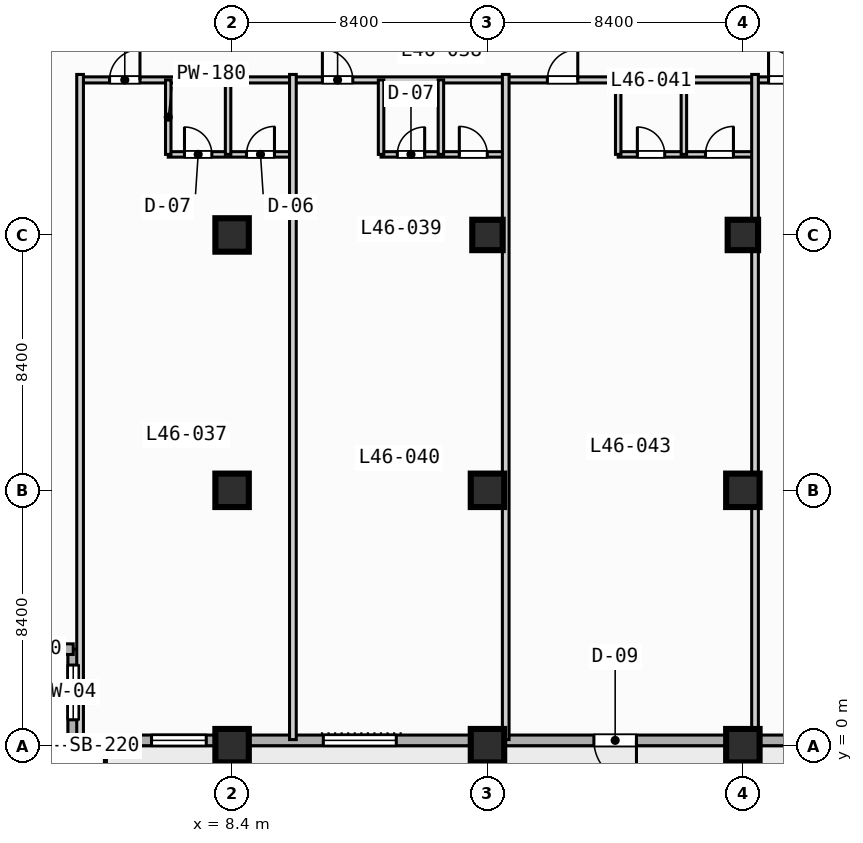
"""IFC4 building model, lengths in metres.
Left out: names, types, materials, properties, quantities, classifications, styles, units other than length and angle.
Written with IfcOpenShell. Run it as: python <this file> out.ifc"""

import sys

from ifc_helpers import new_model, si_unit, direction, frame, frame_2d, origin, origin_2d, place, context, subcontext, project, spatial, rectangle, extrude, element, fill, save


model = new_model("IFC4")
c1 = context("Model", 3, precision=1e-05, world=origin(), true_north=direction((0.0, 1.0)))
c2 = subcontext(c1, "Body", "Model", "MODEL_VIEW")
j1 = project(units=[si_unit("LENGTHUNIT", "METRE"), si_unit("PLANEANGLEUNIT", "RADIAN")], contexts=[c1])
p1 = place(None, origin())
s1 = spatial("IfcSite", under=j1, at=p1, CompositionType="ELEMENT")
p2 = place(p1, origin())
s2 = spatial("IfcBuilding", under=s1, at=p2, CompositionType="ELEMENT")
p3 = place(p2, frame((0.0, 0.0, 190.2)))
s3 = spatial("IfcBuildingStorey", under=s2, at=p3, CompositionType="ELEMENT", Elevation=190.2)
for number, where, z_axis, x_axis in (
    (1, (8.4, 0.0, 0.0), (0.0, 0.0, 1.0), (1.0, 0.0, 0.0)),
    (2, (8.4, 8.4, 0.0), (0.0, 0.0, 1.0), (1.0, 0.0, 0.0)),
    (3, (8.4, 16.8, 0.0), (0.0, 0.0, 1.0), (1.0, 0.0, 0.0)),
    (4, (16.8, 0.0, 0.0), (0.0, 0.0, 1.0), (1.0, 0.0, 0.0)),
    (5, (16.8, 8.4, 0.0), (0.0, 0.0, 1.0), (1.0, 0.0, 0.0)),
):
    element("IfcColumn", number, at=place(p3, frame(where, z_axis=z_axis, x_axis=x_axis)), inside=s3, PredefinedType="COLUMN", context=c2, shape_type="SweptSolid", body=[
        extrude(rectangle(XDim=1.1, YDim=1.1, at=origin_2d()), origin(), (0.0, 0.0, 1.0), 3.7),
    ])
p4 = place(p3, frame((16.8, 16.8, 0.0), z_axis=(0.0, 0.0, 1.0), x_axis=(1.0, 0.0, 0.0)))
e6 = element("IfcColumn", 6, at=p4, inside=s3, PredefinedType="COLUMN", context=c2, shape_type="SweptSolid", body=[
    extrude(rectangle(XDim=1.0, YDim=1.0, at=origin_2d()), origin(), (0.0, 0.0, 1.0), 3.7),
])
for number, where, z_axis, x_axis in (
    (7, (25.2, 0.0, 0.0), (0.0, 0.0, 1.0), (1.0, 0.0, 0.0)),
    (8, (25.2, 8.4, 0.0), (0.0, 0.0, 1.0), (1.0, 0.0, 0.0)),
):
    element("IfcColumn", number, at=place(p3, frame(where, z_axis=z_axis, x_axis=x_axis)), inside=s3, PredefinedType="COLUMN", context=c2, shape_type="SweptSolid", body=[
        extrude(rectangle(XDim=1.1, YDim=1.1, at=origin_2d()), origin(), (0.0, 0.0, 1.0), 3.7),
    ])
p5 = place(p3, frame((25.2, 16.8, 0.0), z_axis=(0.0, 0.0, 1.0), x_axis=(1.0, 0.0, 0.0)))
e9 = element("IfcColumn", 9, at=p5, inside=s3, PredefinedType="COLUMN", context=c2, shape_type="SweptSolid", body=[
    extrude(rectangle(XDim=1.0, YDim=1.0, at=origin_2d()), origin(), (0.0, 0.0, 1.0), 3.7),
])
p6 = place(p3, frame((3.175, 0.175, 0.0), z_axis=(0.0, 0.0, 1.0), x_axis=(0.0, 1.0, 0.0)))
e10 = element("IfcWall", 10, at=p6, inside=s3, PredefinedType="STANDARD", context=c2, shape_type="SweptSolid", body=[
    extrude(rectangle(XDim=3.0, YDim=0.35, at=frame_2d((1.5, 0.0))), origin(), (0.0, 0.0, 1.0), 3.47),
])
p7 = place(p6, frame((0.677, 0.0, 0.85)))
e11 = element("IfcOpeningElement", 11, at=p7, cuts=e10, PredefinedType="OPENING", context=c2, shape_type="SweptSolid", body=[
    extrude(rectangle(XDim=1.8, YDim=1.8, at=frame_2d((0.9, 0.9))), frame((0.0, 0.185, 0.0), z_axis=(0.0, -1.0, 0.0), x_axis=(1.0, 0.0, 0.0)), (0.0, 0.0, 1.0), 0.37),
])
p8 = place(p3, frame((3.175, 3.175, 0.0), z_axis=(0.0, 0.0, 1.0), x_axis=(-1.0, 0.0, 0.0)))
e12 = element("IfcWall", 12, at=p8, inside=s3, PredefinedType="STANDARD", context=c2, shape_type="SweptSolid", body=[
    extrude(rectangle(XDim=3.0, YDim=0.35, at=frame_2d((1.5, 0.0))), origin(), (0.0, 0.0, 1.0), 3.47),
])
p9 = place(p3, frame((72.425, 0.175, 0.0), z_axis=(0.0, 0.0, 1.0), x_axis=(-1.0, 0.0, 0.0)))
e13 = element("IfcWall", 13, at=p9, inside=s3, PredefinedType="STANDARD", context=c2, shape_type="SweptSolid", body=[
    extrude(rectangle(XDim=69.25, YDim=0.35, at=frame_2d((34.625, 0.0))), origin(), (0.0, 0.0, 1.0), 3.47),
])
p10 = place(p9, frame((50.725, 0.0, 0.0)))
e14 = element("IfcOpeningElement", 14, at=p10, cuts=e13, PredefinedType="OPENING", context=c2, shape_type="SweptSolid", body=[
    extrude(rectangle(XDim=1.4, YDim=2.2, at=frame_2d((0.7, 1.1))), frame((0.0, 0.185, 0.0), z_axis=(0.0, -1.0, 0.0), x_axis=(1.0, 0.0, 0.0)), (0.0, 0.0, 1.0), 0.37),
])
p11 = place(p9, frame((58.625, 0.0, 0.85)))
e15 = element("IfcOpeningElement", 15, at=p11, cuts=e13, PredefinedType="OPENING", context=c2, shape_type="SweptSolid", body=[
    extrude(rectangle(XDim=2.4, YDim=1.95, at=frame_2d((1.2, 0.975))), frame((0.0, 0.185, 0.0), z_axis=(0.0, -1.0, 0.0), x_axis=(1.0, 0.0, 0.0)), (0.0, 0.0, 1.0), 0.37),
])
p12 = place(p9, frame((41.825, 0.0, 0.85)))
e16 = element("IfcOpeningElement", 16, at=p12, cuts=e13, PredefinedType="OPENING", context=c2, shape_type="SweptSolid", body=[
    extrude(rectangle(XDim=2.4, YDim=1.95, at=frame_2d((1.2, 0.975))), frame((0.0, 0.185, 0.0), z_axis=(0.0, -1.0, 0.0), x_axis=(1.0, 0.0, 0.0)), (0.0, 0.0, 1.0), 0.37),
])
p13 = place(p9, frame((33.725, 0.0, 0.85)))
e17 = element("IfcOpeningElement", 17, at=p13, cuts=e13, PredefinedType="OPENING", context=c2, shape_type="SweptSolid", body=[
    extrude(rectangle(XDim=1.8, YDim=1.8, at=frame_2d((0.9, 0.9))), frame((0.0, 0.185, 0.0), z_axis=(0.0, -1.0, 0.0), x_axis=(1.0, 0.0, 0.0)), (0.0, 0.0, 1.0), 0.37),
])
p14 = place(p9, frame((25.025, 0.0, 0.85)))
e18 = element("IfcOpeningElement", 18, at=p14, cuts=e13, PredefinedType="OPENING", context=c2, shape_type="SweptSolid", body=[
    extrude(rectangle(XDim=2.4, YDim=1.95, at=frame_2d((1.2, 0.975))), frame((0.0, 0.185, 0.0), z_axis=(0.0, -1.0, 0.0), x_axis=(1.0, 0.0, 0.0)), (0.0, 0.0, 1.0), 0.37),
])
p15 = place(p9, frame((64.875, 0.0, 0.85)))
e19 = element("IfcOpeningElement", 19, at=p15, cuts=e13, PredefinedType="OPENING", context=c2, shape_type="SweptSolid", body=[
    extrude(rectangle(XDim=1.8, YDim=1.8, at=frame_2d((0.9, 0.9))), frame((0.0, 0.185, 0.0), z_axis=(0.0, -1.0, 0.0), x_axis=(1.0, 0.0, 0.0)), (0.0, 0.0, 1.0), 0.37),
])
p16 = place(p3, frame((3.4, 21.9, 0.0), z_axis=(0.0, 0.0, 1.0), x_axis=(1.0, 0.0, 0.0)))
e20 = element("IfcWall", 20, at=p16, inside=s3, PredefinedType="PARTITIONING", context=c2, shape_type="SweptSolid", body=[
    extrude(rectangle(XDim=35.8, YDim=0.2, at=frame_2d((17.9, 0.0))), origin(), (0.0, 0.0, 1.0), 3.47),
])
p17 = place(p16, frame((0.97, 0.0, 0.0)))
e21 = element("IfcOpeningElement", 21, at=p17, cuts=e20, PredefinedType="OPENING", context=c2, shape_type="SweptSolid", body=[
    extrude(rectangle(XDim=1.0, YDim=2.15, at=frame_2d((0.5, 1.075))), frame((0.0, 0.11, 0.0), z_axis=(0.0, -1.0, 0.0), x_axis=(1.0, 0.0, 0.0)), (0.0, 0.0, 1.0), 0.22),
])
p18 = place(p16, frame((7.97, 0.0, 0.0)))
e22 = element("IfcOpeningElement", 22, at=p18, cuts=e20, PredefinedType="OPENING", context=c2, shape_type="SweptSolid", body=[
    extrude(rectangle(XDim=1.0, YDim=2.15, at=frame_2d((0.5, 1.075))), frame((0.0, 0.11, 0.0), z_axis=(0.0, -1.0, 0.0), x_axis=(1.0, 0.0, 0.0)), (0.0, 0.0, 1.0), 0.22),
])
p19 = place(p16, frame((15.37, 0.0, 0.0)))
e23 = element("IfcOpeningElement", 23, at=p19, cuts=e20, PredefinedType="OPENING", context=c2, shape_type="SweptSolid", body=[
    extrude(rectangle(XDim=1.0, YDim=2.15, at=frame_2d((0.5, 1.075))), frame((0.0, 0.11, 0.0), z_axis=(0.0, -1.0, 0.0), x_axis=(1.0, 0.0, 0.0)), (0.0, 0.0, 1.0), 0.22),
])
p20 = place(p16, frame((22.645, 0.0, 0.0)))
e24 = element("IfcOpeningElement", 24, at=p20, cuts=e20, PredefinedType="OPENING", context=c2, shape_type="SweptSolid", body=[
    extrude(rectangle(XDim=1.0, YDim=2.15, at=frame_2d((0.5, 1.075))), frame((0.0, 0.11, 0.0), z_axis=(0.0, -1.0, 0.0), x_axis=(1.0, 0.0, 0.0)), (0.0, 0.0, 1.0), 0.22),
])
p21 = place(p16, frame((28.97, 0.0, 0.0)))
e25 = element("IfcOpeningElement", 25, at=p21, cuts=e20, PredefinedType="OPENING", context=c2, shape_type="SweptSolid", body=[
    extrude(rectangle(XDim=1.0, YDim=2.15, at=frame_2d((0.5, 1.075))), frame((0.0, 0.11, 0.0), z_axis=(0.0, -1.0, 0.0), x_axis=(1.0, 0.0, 0.0)), (0.0, 0.0, 1.0), 0.22),
])
p22 = place(p3, frame((3.4, 0.2, 0.0), z_axis=(0.0, 0.0, 1.0), x_axis=(0.0, 1.0, 0.0)))
e26 = element("IfcWall", 26, at=p22, inside=s3, PredefinedType="PARTITIONING", context=c2, shape_type="SweptSolid", body=[
    extrude(rectangle(XDim=21.88, YDim=0.22, at=frame_2d((10.94, 0.0))), origin(), (0.0, 0.0, 1.0), 3.47),
])
p23 = place(p3, frame((6.3, 19.45, 0.0), z_axis=(0.0, 0.0, 1.0), x_axis=(1.0, 0.0, 0.0)))
e27 = element("IfcWall", 27, at=p23, inside=s3, PredefinedType="PLUMBINGWALL", context=c2, shape_type="SweptSolid", body=[
    extrude(rectangle(XDim=4.1, YDim=0.18, at=frame_2d((2.05, 0.0))), origin(), (0.0, 0.0, 1.0), 3.47),
])
p24 = place(p23, frame((0.534, 0.0, 0.0)))
e28 = element("IfcOpeningElement", 28, at=p24, cuts=e27, PredefinedType="OPENING", context=c2, shape_type="SweptSolid", body=[
    extrude(rectangle(XDim=0.9, YDim=2.1, at=frame_2d((0.45, 1.05))), frame((0.0, 0.1, 0.0), z_axis=(0.0, -1.0, 0.0), x_axis=(1.0, 0.0, 0.0)), (0.0, 0.0, 1.0), 0.2),
])
p25 = place(p23, frame((2.574, 0.0, 0.0)))
e29 = element("IfcOpeningElement", 29, at=p25, cuts=e27, PredefinedType="OPENING", context=c2, shape_type="SweptSolid", body=[
    extrude(rectangle(XDim=0.92, YDim=2.1, at=frame_2d((0.46, 1.05))), frame((0.0, 0.1, 0.0), z_axis=(0.0, -1.0, 0.0), x_axis=(1.0, 0.0, 0.0)), (0.0, 0.0, 1.0), 0.2),
])
p26 = place(p3, frame((6.3, 19.45, 0.0), z_axis=(0.0, 0.0, 1.0), x_axis=(0.0, 1.0, 0.0)))
e30 = element("IfcWall", 30, at=p26, inside=s3, PredefinedType="PLUMBINGWALL", context=c2, shape_type="SweptSolid", body=[
    extrude(rectangle(XDim=2.45, YDim=0.18, at=frame_2d((1.225, 0.0))), origin(), (0.0, 0.0, 1.0), 3.47),
])
p27 = place(p3, frame((8.268, 19.45, 0.0), z_axis=(0.0, 0.0, 1.0), x_axis=(0.0, 1.0, 0.0)))
e31 = element("IfcWall", 31, at=p27, inside=s3, PredefinedType="PLUMBINGWALL", context=c2, shape_type="SweptSolid", body=[
    extrude(rectangle(XDim=2.45, YDim=0.18, at=frame_2d((1.225, 0.0))), origin(), (0.0, 0.0, 1.0), 2.82),
])
p28 = place(p3, frame((10.4, 0.2, 0.0), z_axis=(0.0, 0.0, 1.0), x_axis=(0.0, 1.0, 0.0)))
e32 = element("IfcWall", 32, at=p28, inside=s3, PredefinedType="PARTITIONING", context=c2, shape_type="SweptSolid", body=[
    extrude(rectangle(XDim=21.88, YDim=0.22, at=frame_2d((10.94, 0.0))), origin(), (0.0, 0.0, 1.0), 3.47),
])
p29 = place(p3, frame((13.3, 19.45, 0.0), z_axis=(0.0, 0.0, 1.0), x_axis=(1.0, 0.0, 0.0)))
e33 = element("IfcWall", 33, at=p29, inside=s3, PredefinedType="PLUMBINGWALL", context=c2, shape_type="SweptSolid", body=[
    extrude(rectangle(XDim=4.1, YDim=0.18, at=frame_2d((2.05, 0.0))), origin(), (0.0, 0.0, 1.0), 3.47),
])
p30 = place(p29, frame((0.534, 0.0, 0.0)))
e34 = element("IfcOpeningElement", 34, at=p30, cuts=e33, PredefinedType="OPENING", context=c2, shape_type="SweptSolid", body=[
    extrude(rectangle(XDim=0.9, YDim=2.1, at=frame_2d((0.45, 1.05))), frame((0.0, 0.1, 0.0), z_axis=(0.0, -1.0, 0.0), x_axis=(1.0, 0.0, 0.0)), (0.0, 0.0, 1.0), 0.2),
])
p31 = place(p29, frame((2.574, 0.0, 0.0)))
e35 = element("IfcOpeningElement", 35, at=p31, cuts=e33, PredefinedType="OPENING", context=c2, shape_type="SweptSolid", body=[
    extrude(rectangle(XDim=0.92, YDim=2.1, at=frame_2d((0.46, 1.05))), frame((0.0, 0.1, 0.0), z_axis=(0.0, -1.0, 0.0), x_axis=(1.0, 0.0, 0.0)), (0.0, 0.0, 1.0), 0.2),
])
for number, where, z_axis, x_axis in (
    (36, (13.3, 19.45, 0.0), (0.0, 0.0, 1.0), (0.0, 1.0, 0.0)),
    (37, (15.268, 19.45, 0.0), (0.0, 0.0, 1.0), (0.0, 1.0, 0.0)),
):
    element("IfcWall", number, at=place(p3, frame(where, z_axis=z_axis, x_axis=x_axis)), inside=s3, PredefinedType="PLUMBINGWALL", context=c2, shape_type="SweptSolid", body=[
        extrude(rectangle(XDim=2.45, YDim=0.18, at=frame_2d((1.225, 0.0))), origin(), (0.0, 0.0, 1.0), 3.47),
    ])
p32 = place(p3, frame((17.4, 0.2, 0.0), z_axis=(0.0, 0.0, 1.0), x_axis=(0.0, 1.0, 0.0)))
e38 = element("IfcWall", 38, at=p32, inside=s3, PredefinedType="PARTITIONING", context=c2, shape_type="SweptSolid", body=[
    extrude(rectangle(XDim=21.88, YDim=0.22, at=frame_2d((10.94, 0.0))), origin(), (0.0, 0.0, 1.0), 3.47),
])
p33 = place(p3, frame((21.1, 19.45, 0.0), z_axis=(0.0, 0.0, 1.0), x_axis=(1.0, 0.0, 0.0)))
e39 = element("IfcWall", 39, at=p33, inside=s3, PredefinedType="PLUMBINGWALL", context=c2, shape_type="SweptSolid", body=[
    extrude(rectangle(XDim=4.5, YDim=0.18, at=frame_2d((2.25, 0.0))), origin(), (0.0, 0.0, 1.0), 3.47),
])
p34 = place(p33, frame((0.63, 0.0, 0.0)))
e40 = element("IfcOpeningElement", 40, at=p34, cuts=e39, PredefinedType="OPENING", context=c2, shape_type="SweptSolid", body=[
    extrude(rectangle(XDim=0.9, YDim=2.1, at=frame_2d((0.45, 1.05))), frame((0.0, 0.1, 0.0), z_axis=(0.0, -1.0, 0.0), x_axis=(1.0, 0.0, 0.0)), (0.0, 0.0, 1.0), 0.2),
])
p35 = place(p33, frame((2.87, 0.0, 0.0)))
e41 = element("IfcOpeningElement", 41, at=p35, cuts=e39, PredefinedType="OPENING", context=c2, shape_type="SweptSolid", body=[
    extrude(rectangle(XDim=0.92, YDim=2.1, at=frame_2d((0.46, 1.05))), frame((0.0, 0.1, 0.0), z_axis=(0.0, -1.0, 0.0), x_axis=(1.0, 0.0, 0.0)), (0.0, 0.0, 1.0), 0.2),
])
for number, where, z_axis, x_axis in (
    (42, (21.1, 19.45, 0.0), (0.0, 0.0, 1.0), (0.0, 1.0, 0.0)),
    (43, (23.26, 19.45, 0.0), (0.0, 0.0, 1.0), (0.0, 1.0, 0.0)),
):
    element("IfcWall", number, at=place(p3, frame(where, z_axis=z_axis, x_axis=x_axis)), inside=s3, PredefinedType="PLUMBINGWALL", context=c2, shape_type="SweptSolid", body=[
        extrude(rectangle(XDim=2.45, YDim=0.18, at=frame_2d((1.225, 0.0))), origin(), (0.0, 0.0, 1.0), 3.47),
    ])
p36 = place(p3, frame((25.6, 0.2, 0.0), z_axis=(0.0, 0.0, 1.0), x_axis=(0.0, 1.0, 0.0)))
e44 = element("IfcWall", 44, at=p36, inside=s3, PredefinedType="PARTITIONING", context=c2, shape_type="SweptSolid", body=[
    extrude(rectangle(XDim=21.88, YDim=0.22, at=frame_2d((10.94, 0.0))), origin(), (0.0, 0.0, 1.0), 3.47),
])
p37 = place(p7, origin())
e45 = element("IfcWindow", 45, at=p37, inside=s3, PartitioningType="SINGLE_PANEL", PredefinedType="WINDOW", context=c2, shape_type="SweptSolid", body=[
    extrude(rectangle(XDim=1.8, YDim=1.8, at=frame_2d((0.9, 0.9))), frame((0.0, 0.03, 0.0), z_axis=(0.0, -1.0, 0.0), x_axis=(1.0, 0.0, 0.0)), (0.0, 0.0, 1.0), 0.06),
])
fill(e11, e45)
p38 = place(p10, origin())
e46 = element("IfcDoor", 46, at=p38, inside=s3, OperationType="SINGLE_SWING_LEFT", PredefinedType="DOOR", context=c2, shape_type="SweptSolid", body=[
    extrude(rectangle(XDim=1.4, YDim=2.2, at=frame_2d((0.7, 1.1))), frame((0.0, 0.025, 0.0), z_axis=(0.0, -1.0, 0.0), x_axis=(1.0, 0.0, 0.0)), (0.0, 0.0, 1.0), 0.05),
])
fill(e14, e46)
p39 = place(p11, origin())
e47 = element("IfcWindow", 47, at=p39, inside=s3, PartitioningType="SINGLE_PANEL", PredefinedType="WINDOW", context=c2, shape_type="SweptSolid", body=[
    extrude(rectangle(XDim=2.4, YDim=1.95, at=frame_2d((1.2, 0.975))), frame((0.0, 0.03, 0.0), z_axis=(0.0, -1.0, 0.0), x_axis=(1.0, 0.0, 0.0)), (0.0, 0.0, 1.0), 0.06),
])
fill(e15, e47)
p40 = place(p15, origin())
e48 = element("IfcWindow", 48, at=p40, inside=s3, PartitioningType="SINGLE_PANEL", PredefinedType="WINDOW", context=c2, shape_type="SweptSolid", body=[
    extrude(rectangle(XDim=1.8, YDim=1.8, at=frame_2d((0.9, 0.9))), frame((0.0, 0.03, 0.0), z_axis=(0.0, -1.0, 0.0), x_axis=(1.0, 0.0, 0.0)), (0.0, 0.0, 1.0), 0.06),
])
fill(e19, e48)
p41 = place(p17, origin())
e49 = element("IfcDoor", 49, at=p41, inside=s3, OperationType="SINGLE_SWING_RIGHT", PredefinedType="DOOR", context=c2, shape_type="SweptSolid", body=[
    extrude(rectangle(XDim=1.0, YDim=2.15, at=frame_2d((0.5, 1.075))), frame((0.0, 0.025, 0.0), z_axis=(0.0, -1.0, 0.0), x_axis=(1.0, 0.0, 0.0)), (0.0, 0.0, 1.0), 0.05),
])
fill(e21, e49)
p42 = place(p18, origin())
e50 = element("IfcDoor", 50, at=p42, inside=s3, OperationType="SINGLE_SWING_LEFT", PredefinedType="DOOR", context=c2, shape_type="SweptSolid", body=[
    extrude(rectangle(XDim=1.0, YDim=2.15, at=frame_2d((0.5, 1.075))), frame((0.0, 0.025, 0.0), z_axis=(0.0, -1.0, 0.0), x_axis=(1.0, 0.0, 0.0)), (0.0, 0.0, 1.0), 0.05),
])
fill(e22, e50)
p43 = place(p19, origin())
e51 = element("IfcDoor", 51, at=p43, inside=s3, OperationType="SINGLE_SWING_RIGHT", PredefinedType="DOOR", context=c2, shape_type="SweptSolid", body=[
    extrude(rectangle(XDim=1.0, YDim=2.15, at=frame_2d((0.5, 1.075))), frame((0.0, 0.025, 0.0), z_axis=(0.0, -1.0, 0.0), x_axis=(1.0, 0.0, 0.0)), (0.0, 0.0, 1.0), 0.05),
])
fill(e23, e51)
p44 = place(p20, origin())
e52 = element("IfcDoor", 52, at=p44, inside=s3, OperationType="SINGLE_SWING_LEFT", PredefinedType="DOOR", context=c2, shape_type="SweptSolid", body=[
    extrude(rectangle(XDim=1.0, YDim=2.15, at=frame_2d((0.5, 1.075))), frame((0.0, 0.025, 0.0), z_axis=(0.0, -1.0, 0.0), x_axis=(1.0, 0.0, 0.0)), (0.0, 0.0, 1.0), 0.05),
])
fill(e24, e52)
p45 = place(p24, origin())
e53 = element("IfcDoor", 53, at=p45, inside=s3, OperationType="SINGLE_SWING_LEFT", PredefinedType="DOOR", context=c2, shape_type="SweptSolid", body=[
    extrude(rectangle(XDim=0.9, YDim=2.1, at=frame_2d((0.45, 1.05))), frame((0.0, 0.025, 0.0), z_axis=(0.0, -1.0, 0.0), x_axis=(1.0, 0.0, 0.0)), (0.0, 0.0, 1.0), 0.05),
])
fill(e28, e53)
p46 = place(p25, origin())
e54 = element("IfcDoor", 54, at=p46, inside=s3, OperationType="SINGLE_SWING_RIGHT", PredefinedType="DOOR", context=c2, shape_type="SweptSolid", body=[
    extrude(rectangle(XDim=0.92, YDim=2.1, at=frame_2d((0.46, 1.05))), frame((0.0, 0.025, 0.0), z_axis=(0.0, -1.0, 0.0), x_axis=(1.0, 0.0, 0.0)), (0.0, 0.0, 1.0), 0.05),
])
fill(e29, e54)
p47 = place(p30, origin())
e55 = element("IfcDoor", 55, at=p47, inside=s3, OperationType="SINGLE_SWING_RIGHT", PredefinedType="DOOR", context=c2, shape_type="SweptSolid", body=[
    extrude(rectangle(XDim=0.9, YDim=2.1, at=frame_2d((0.45, 1.05))), frame((0.0, 0.025, 0.0), z_axis=(0.0, -1.0, 0.0), x_axis=(1.0, 0.0, 0.0)), (0.0, 0.0, 1.0), 0.05),
])
fill(e34, e55)
p48 = place(p31, origin())
e56 = element("IfcDoor", 56, at=p48, inside=s3, OperationType="SINGLE_SWING_LEFT", PredefinedType="DOOR", context=c2, shape_type="SweptSolid", body=[
    extrude(rectangle(XDim=0.92, YDim=2.1, at=frame_2d((0.46, 1.05))), frame((0.0, 0.025, 0.0), z_axis=(0.0, -1.0, 0.0), x_axis=(1.0, 0.0, 0.0)), (0.0, 0.0, 1.0), 0.05),
])
fill(e35, e56)
p49 = place(p34, origin())
e57 = element("IfcDoor", 57, at=p49, inside=s3, OperationType="SINGLE_SWING_LEFT", PredefinedType="DOOR", context=c2, shape_type="SweptSolid", body=[
    extrude(rectangle(XDim=0.9, YDim=2.1, at=frame_2d((0.45, 1.05))), frame((0.0, 0.025, 0.0), z_axis=(0.0, -1.0, 0.0), x_axis=(1.0, 0.0, 0.0)), (0.0, 0.0, 1.0), 0.05),
])
fill(e40, e57)
p50 = place(p35, origin())
e58 = element("IfcDoor", 58, at=p50, inside=s3, OperationType="SINGLE_SWING_RIGHT", PredefinedType="DOOR", context=c2, shape_type="SweptSolid", body=[
    extrude(rectangle(XDim=0.92, YDim=2.1, at=frame_2d((0.46, 1.05))), frame((0.0, 0.025, 0.0), z_axis=(0.0, -1.0, 0.0), x_axis=(1.0, 0.0, 0.0)), (0.0, 0.0, 1.0), 0.05),
])
fill(e41, e58)
save(model, sys.argv[1])
